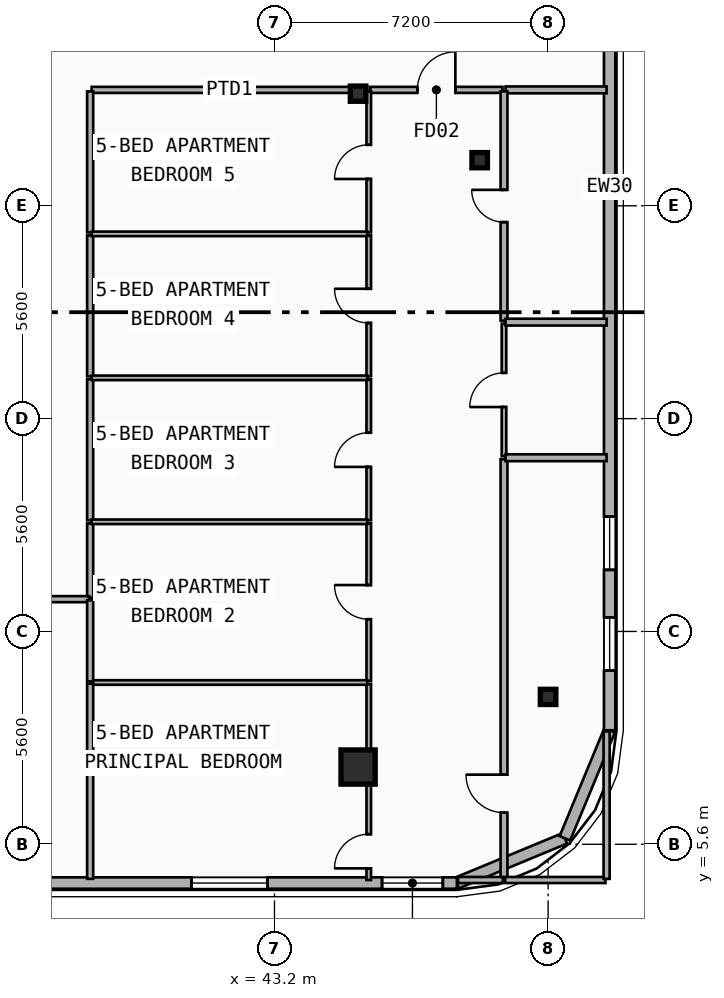
"""IFC4 building model, lengths in metres.
Left out: names, types, materials, properties, quantities, classifications, styles, units other than length and angle.
Written with IfcOpenShell. Run it as: python <this file> out.ifc"""

import sys

from ifc_helpers import new_model, si_unit, direction, frame, frame_2d, origin, origin_2d, place, context, subcontext, project, spatial, rectangle, i_section, extrude, element, fill, save


model = new_model("IFC4")
c1 = context("Model", 3, precision=1e-05, world=origin(), true_north=direction((0.0, 1.0)))
c2 = subcontext(c1, "Body", "Model", "MODEL_VIEW")
j1 = project(units=[si_unit("LENGTHUNIT", "METRE"), si_unit("PLANEANGLEUNIT", "RADIAN")], contexts=[c1])
p1 = place(None, origin())
s1 = spatial("IfcSite", under=j1, at=p1, CompositionType="ELEMENT")
p2 = place(p1, origin())
s2 = spatial("IfcBuilding", under=s1, at=p2, CompositionType="ELEMENT")
p3 = place(p2, frame((0.0, 0.0, 204.0)))
s3 = spatial("IfcBuildingStorey", under=s2, at=p3, CompositionType="ELEMENT", Elevation=204.0)
p4 = place(p3, frame((45.4, 25.35, 0.0), z_axis=(0.0, 0.0, 1.0), x_axis=(1.0, 0.0, 0.0)))
e1 = element("IfcColumn", 1, at=p4, inside=s3, PredefinedType="COLUMN", context=c2, shape_type="SweptSolid", body=[
    extrude(i_section(OverallWidth=0.408, OverallDepth=0.4, WebThickness=0.025, FlangeThickness=0.039, FilletRadius=0.015, at=origin_2d()), origin(), (0.0, 0.0, 1.0), 3.6),
])
p5 = place(p3, frame((45.4, 7.741, 0.0), z_axis=(0.0, -0.090231265542, 0.995920839584), x_axis=(1.0, 0.0, 0.0)))
e2 = element("IfcColumn", 2, at=p5, inside=s3, PredefinedType="COLUMN", context=c2, shape_type="SweptSolid", body=[
    extrude(rectangle(XDim=0.9, YDim=0.9, at=origin_2d()), origin(), (0.0, 0.0, 1.0), 3.615),
])
p6 = place(p3, frame((48.6, 23.6, 0.0), z_axis=(0.0, 0.0, 1.0), x_axis=(1.0, 0.0, 0.0)))
e3 = element("IfcColumn", 3, at=p6, inside=s3, PredefinedType="COLUMN", context=c2, shape_type="SweptSolid", body=[
    extrude(i_section(OverallWidth=0.408, OverallDepth=0.4, WebThickness=0.025, FlangeThickness=0.039, FilletRadius=0.015, at=origin_2d()), origin(), (0.0, 0.0, 1.0), 3.6),
])
p7 = place(p3, frame((50.4, 9.574, 0.0), z_axis=(0.0, -0.079901051777, 0.996802799918), x_axis=(1.0, 0.0, 0.0)))
e4 = element("IfcColumn", 4, at=p7, inside=s3, PredefinedType="COLUMN", context=c2, shape_type="SweptSolid", body=[
    extrude(i_section(OverallWidth=0.408, OverallDepth=0.4, WebThickness=0.025, FlangeThickness=0.039, FilletRadius=0.015, at=origin_2d()), origin(), (0.0, 0.0, 1.0), 3.612),
])
p8 = place(p3, frame((50.843, 5.757, 0.0), z_axis=(0.0, 0.0, 1.0), x_axis=(-0.92389884758, -0.382636798336, 0.0)))
e5 = element("IfcWall", 5, at=p8, inside=s3, PredefinedType="SOLIDWALL", context=c2, shape_type="SweptSolid", body=[
    extrude(rectangle(XDim=3.077, YDim=0.3, at=frame_2d((1.538, 0.0))), origin(), (0.0, 0.0, 1.0), 3.34),
])
p9 = place(p3, frame((52.02, 8.6, 0.0), z_axis=(0.0, 0.0, 1.0), x_axis=(-0.382676475685, -0.923882414032, 0.0)))
e6 = element("IfcWall", 6, at=p9, inside=s3, PredefinedType="SOLIDWALL", context=c2, shape_type="SweptSolid", body=[
    extrude(rectangle(XDim=3.077, YDim=0.3, at=frame_2d((1.539, 0.0))), origin(), (0.0, 0.0, 1.0), 3.34),
])
p10 = place(p3, frame((52.02, 37.2, 0.0), z_axis=(0.0, 0.0, 1.0), x_axis=(0.0, -1.0, 0.0)))
e7 = element("IfcWall", 7, at=p10, inside=s3, PredefinedType="SOLIDWALL", context=c2, shape_type="SweptSolid", body=[
    extrude(rectangle(XDim=28.6, YDim=0.3, at=frame_2d((14.3, 0.0))), origin(), (0.0, 0.0, 1.0), 3.34),
])
p11 = place(p10, frame((2.38, 0.0, 0.34)))
e8 = element("IfcOpeningElement", 8, at=p11, cuts=e7, PredefinedType="OPENING", context=c2, shape_type="SweptSolid", body=[
    extrude(rectangle(XDim=1.4, YDim=2.1, at=frame_2d((0.7, 1.05))), frame((0.0, 0.16, 0.0), z_axis=(0.0, -1.0, 0.0), x_axis=(1.0, 0.0, 0.0)), (0.0, 0.0, 1.0), 0.32),
])
p12 = place(p10, frame((5.84, 0.0, 0.34)))
e9 = element("IfcOpeningElement", 9, at=p12, cuts=e7, PredefinedType="OPENING", context=c2, shape_type="SweptSolid", body=[
    extrude(rectangle(XDim=1.4, YDim=2.1, at=frame_2d((0.7, 1.05))), frame((0.0, 0.16, 0.0), z_axis=(0.0, -1.0, 0.0), x_axis=(1.0, 0.0, 0.0)), (0.0, 0.0, 1.0), 0.32),
])
p13 = place(p10, frame((22.979, 0.0, 0.34)))
e10 = element("IfcOpeningElement", 10, at=p13, cuts=e7, PredefinedType="OPENING", context=c2, shape_type="SweptSolid", body=[
    extrude(rectangle(XDim=1.4, YDim=2.1, at=frame_2d((0.7, 1.05))), frame((0.0, 0.16, 0.0), z_axis=(0.0, -1.0, 0.0), x_axis=(1.0, 0.0, 0.0)), (0.0, 0.0, 1.0), 0.32),
])
p14 = place(p10, frame((25.63, 0.0, 0.34)))
e11 = element("IfcOpeningElement", 11, at=p14, cuts=e7, PredefinedType="OPENING", context=c2, shape_type="SweptSolid", body=[
    extrude(rectangle(XDim=1.4, YDim=2.1, at=frame_2d((0.7, 1.05))), frame((0.0, 0.16, 0.0), z_axis=(0.0, -1.0, 0.0), x_axis=(1.0, 0.0, 0.0)), (0.0, 0.0, 1.0), 0.32),
])
p15 = place(p3, frame((48.0, 4.58, 0.0), z_axis=(0.0, 0.0, 1.0), x_axis=(-1.0, 0.0, 0.0)))
e12 = element("IfcWall", 12, at=p15, inside=s3, PredefinedType="SOLIDWALL", context=c2, shape_type="SweptSolid", body=[
    extrude(rectangle(XDim=38.4, YDim=0.3, at=frame_2d((19.2, 0.0))), origin(), (0.0, 0.0, 1.0), 3.34),
])
p16 = place(p15, frame((36.19, 0.0, 0.8)))
e13 = element("IfcOpeningElement", 13, at=p16, cuts=e12, PredefinedType="OPENING", context=c2, shape_type="SweptSolid", body=[
    extrude(rectangle(XDim=1.8, YDim=1.8, at=frame_2d((0.9, 0.9))), frame((0.0, 0.16, 0.0), z_axis=(0.0, -1.0, 0.0), x_axis=(1.0, 0.0, 0.0)), (0.0, 0.0, 1.0), 0.32),
])
p17 = place(p15, frame((31.475, 0.0, 0.7)))
e14 = element("IfcOpeningElement", 14, at=p17, cuts=e12, PredefinedType="OPENING", context=c2, shape_type="SweptSolid", body=[
    extrude(rectangle(XDim=2.0, YDim=2.2, at=frame_2d((1.0, 1.1))), frame((0.0, 0.16, 0.0), z_axis=(0.0, -1.0, 0.0), x_axis=(1.0, 0.0, 0.0)), (0.0, 0.0, 1.0), 0.32),
])
p18 = place(p15, frame((18.6, 0.0, 0.7)))
e15 = element("IfcOpeningElement", 15, at=p18, cuts=e12, PredefinedType="OPENING", context=c2, shape_type="SweptSolid", body=[
    extrude(rectangle(XDim=2.0, YDim=2.2, at=frame_2d((1.0, 1.1))), frame((0.0, 0.16, 0.0), z_axis=(0.0, -1.0, 0.0), x_axis=(1.0, 0.0, 0.0)), (0.0, 0.0, 1.0), 0.32),
])
p19 = place(p15, frame((0.369, 0.0, 0.75)))
e16 = element("IfcOpeningElement", 16, at=p19, cuts=e12, PredefinedType="OPENING", context=c2, shape_type="SweptSolid", body=[
    extrude(rectangle(XDim=1.6, YDim=1.95, at=frame_2d((0.8, 0.975))), frame((0.0, 0.16, 0.0), z_axis=(0.0, -1.0, 0.0), x_axis=(1.0, 0.0, 0.0)), (0.0, 0.0, 1.0), 0.32),
])
p20 = place(p15, frame((4.985, 0.0, 0.7)))
e17 = element("IfcOpeningElement", 17, at=p20, cuts=e12, PredefinedType="OPENING", context=c2, shape_type="SweptSolid", body=[
    extrude(rectangle(XDim=2.0, YDim=2.2, at=frame_2d((1.0, 1.1))), frame((0.0, 0.16, 0.0), z_axis=(0.0, -1.0, 0.0), x_axis=(1.0, 0.0, 0.0)), (0.0, 0.0, 1.0), 0.32),
])
p21 = place(p3, frame((45.721, 25.45, 0.0), z_axis=(0.0, 0.0, 1.0), x_axis=(1.0, 0.0, 0.0)))
e18 = element("IfcWall", 18, at=p21, inside=s3, PredefinedType="PARTITIONING", context=c2, shape_type="SweptSolid", body=[
    extrude(rectangle(XDim=3.479, YDim=0.16, at=frame_2d((1.74, 0.0))), origin(), (0.0, 0.0, 1.0), 2.52),
])
p22 = place(p21, frame((1.24, 0.0, 0.0)))
e19 = element("IfcOpeningElement", 19, at=p22, cuts=e18, PredefinedType="OPENING", context=c2, shape_type="SweptSolid", body=[
    extrude(rectangle(XDim=1.0, YDim=2.15, at=frame_2d((0.5, 1.075))), frame((0.0, 0.09, 0.0), z_axis=(0.0, -1.0, 0.0), x_axis=(1.0, 0.0, 0.0)), (0.0, 0.0, 1.0), 0.18),
])
p23 = place(p3, frame((49.28, 25.45, 0.0), z_axis=(0.0, 0.0, 1.0), x_axis=(1.0, 0.0, 0.0)))
e20 = element("IfcWall", 20, at=p23, inside=s3, PredefinedType="PLUMBINGWALL", context=c2, shape_type="SweptSolid", body=[
    extrude(rectangle(XDim=2.66, YDim=0.18, at=frame_2d((1.33, 0.0))), origin(), (0.0, 0.0, 1.0), 2.67),
])
p24 = place(p3, frame((38.39, 25.45, 0.0), z_axis=(0.0, 0.0, 1.0), x_axis=(1.0, 0.0, 0.0)))
e21 = element("IfcWall", 21, at=p24, inside=s3, PredefinedType="PARTITIONING", context=c2, shape_type="SweptSolid", body=[
    extrude(rectangle(XDim=7.251, YDim=0.16, at=frame_2d((3.625, 0.0))), origin(), (0.0, 0.0, 1.0), 2.52),
])
p25 = place(p3, frame((38.35, 12.09, 0.0), z_axis=(0.0, 0.0, 1.0), x_axis=(0.0, 1.0, 0.0)))
e22 = element("IfcWall", 22, at=p25, inside=s3, PredefinedType="PARTITIONING", context=c2, shape_type="SweptSolid", body=[
    extrude(rectangle(XDim=1.955, YDim=0.16, at=frame_2d((0.978, 0.0))), origin(), (0.0, 0.0, 1.0), 3.34),
])
p26 = place(p3, frame((38.35, 14.125, 0.0), z_axis=(0.0, 0.0, 1.0), x_axis=(0.0, 1.0, 0.0)))
e23 = element("IfcWall", 23, at=p26, inside=s3, PredefinedType="PARTITIONING", context=c2, shape_type="SweptSolid", body=[
    extrude(rectangle(XDim=3.708, YDim=0.16, at=frame_2d((1.854, 0.0))), origin(), (0.0, 0.0, 1.0), 3.01),
])
p27 = place(p3, frame((38.35, 17.913, 0.0), z_axis=(0.0, 0.0, 1.0), x_axis=(0.0, 1.0, 0.0)))
e24 = element("IfcWall", 24, at=p27, inside=s3, PredefinedType="PARTITIONING", context=c2, shape_type="SweptSolid", body=[
    extrude(rectangle(XDim=3.708, YDim=0.16, at=frame_2d((1.854, 0.0))), origin(), (0.0, 0.0, 1.0), 2.88),
])
p28 = place(p3, frame((38.35, 21.701, 0.0), z_axis=(0.0, 0.0, 1.0), x_axis=(0.0, 1.0, 0.0)))
e25 = element("IfcWall", 25, at=p28, inside=s3, PredefinedType="PARTITIONING", context=c2, shape_type="SweptSolid", body=[
    extrude(rectangle(XDim=3.709, YDim=0.16, at=frame_2d((1.854, 0.0))), origin(), (0.0, 0.0, 1.0), 3.01),
])
p29 = place(p3, frame((49.24, 4.66, 0.0), z_axis=(0.0, 0.0, 1.0), x_axis=(0.0, 1.0, 0.0)))
e26 = element("IfcWall", 26, at=p29, inside=s3, PredefinedType="PLUMBINGWALL", context=c2, shape_type="SweptSolid", body=[
    extrude(rectangle(XDim=11.071, YDim=0.18, at=frame_2d((5.536, 0.0))), origin(), (0.0, 0.0, 1.0), 2.82),
])
p30 = place(p29, frame((1.772, 0.0, 0.0)))
e27 = element("IfcOpeningElement", 27, at=p30, cuts=e26, PredefinedType="OPENING", context=c2, shape_type="SweptSolid", body=[
    extrude(rectangle(XDim=1.0, YDim=2.15, at=frame_2d((0.5, 1.075))), frame((0.0, 0.1, 0.0), z_axis=(0.0, -1.0, 0.0), x_axis=(1.0, 0.0, 0.0)), (0.0, 0.0, 1.0), 0.2),
])
p31 = place(p3, frame((49.24, 15.811, 0.0), z_axis=(0.0, 0.0, 1.0), x_axis=(0.0, 1.0, 0.0)))
e28 = element("IfcWall", 28, at=p31, inside=s3, PredefinedType="PARTITIONING", context=c2, shape_type="SweptSolid", body=[
    extrude(rectangle(XDim=3.488, YDim=0.12, at=frame_2d((1.744, 0.0))), origin(), (0.0, 0.0, 1.0), 2.82),
])
p32 = place(p31, frame((1.294, 0.0, 0.0)))
e29 = element("IfcOpeningElement", 29, at=p32, cuts=e28, PredefinedType="OPENING", context=c2, shape_type="SweptSolid", body=[
    extrude(rectangle(XDim=0.9, YDim=2.1, at=frame_2d((0.45, 1.05))), frame((0.0, 0.07, 0.0), z_axis=(0.0, -1.0, 0.0), x_axis=(1.0, 0.0, 0.0)), (0.0, 0.0, 1.0), 0.14),
])
p33 = place(p3, frame((49.24, 19.379, 0.0), z_axis=(0.0, 0.0, 1.0), x_axis=(0.0, 1.0, 0.0)))
e30 = element("IfcWall", 30, at=p33, inside=s3, PredefinedType="PLUMBINGWALL", context=c2, shape_type="SweptSolid", body=[
    extrude(rectangle(XDim=6.031, YDim=0.18, at=frame_2d((3.016, 0.0))), origin(), (0.0, 0.0, 1.0), 2.82),
])
p34 = place(p33, frame((2.591, 0.0, 0.0)))
e31 = element("IfcOpeningElement", 31, at=p34, cuts=e30, PredefinedType="OPENING", context=c2, shape_type="SweptSolid", body=[
    extrude(rectangle(XDim=0.85, YDim=2.1, at=frame_2d((0.425, 1.05))), frame((0.0, 0.1, 0.0), z_axis=(0.0, -1.0, 0.0), x_axis=(1.0, 0.0, 0.0)), (0.0, 0.0, 1.0), 0.2),
])
p35 = place(p3, frame((45.681, 4.66, 0.0), z_axis=(0.0, 0.0, 1.0), x_axis=(0.0, 1.0, 0.0)))
e32 = element("IfcWall", 32, at=p35, inside=s3, PredefinedType="PARTITIONING", context=c2, shape_type="SweptSolid", body=[
    extrude(rectangle(XDim=5.157, YDim=0.12, at=frame_2d((2.579, 0.0))), origin(), (0.0, 0.0, 1.0), 2.52),
])
p36 = place(p35, frame((0.306, 0.0, 0.0)))
e33 = element("IfcOpeningElement", 33, at=p36, cuts=e32, PredefinedType="OPENING", context=c2, shape_type="SweptSolid", body=[
    extrude(rectangle(XDim=0.9, YDim=2.1, at=frame_2d((0.45, 1.05))), frame((0.0, 0.07, 0.0), z_axis=(0.0, -1.0, 0.0), x_axis=(1.0, 0.0, 0.0)), (0.0, 0.0, 1.0), 0.14),
])
p37 = place(p3, frame((45.681, 9.897, 0.0), z_axis=(0.0, 0.0, 1.0), x_axis=(0.0, 1.0, 0.0)))
e34 = element("IfcWall", 34, at=p37, inside=s3, PredefinedType="PARTITIONING", context=c2, shape_type="SweptSolid", body=[
    extrude(rectangle(XDim=4.148, YDim=0.12, at=frame_2d((2.074, 0.0))), origin(), (0.0, 0.0, 1.0), 2.52),
])
p38 = place(p37, frame((1.624, 0.0, 0.0)))
e35 = element("IfcOpeningElement", 35, at=p38, cuts=e34, PredefinedType="OPENING", context=c2, shape_type="SweptSolid", body=[
    extrude(rectangle(XDim=0.9, YDim=2.1, at=frame_2d((0.45, 1.05))), frame((0.0, 0.07, 0.0), z_axis=(0.0, -1.0, 0.0), x_axis=(1.0, 0.0, 0.0)), (0.0, 0.0, 1.0), 0.14),
])
p39 = place(p3, frame((45.681, 14.125, 0.0), z_axis=(0.0, 0.0, 1.0), x_axis=(0.0, 1.0, 0.0)))
e36 = element("IfcWall", 36, at=p39, inside=s3, PredefinedType="PARTITIONING", context=c2, shape_type="SweptSolid", body=[
    extrude(rectangle(XDim=3.708, YDim=0.12, at=frame_2d((1.854, 0.0))), origin(), (0.0, 0.0, 1.0), 2.52),
])
p40 = place(p39, frame((1.404, 0.0, 0.0)))
e37 = element("IfcOpeningElement", 37, at=p40, cuts=e36, PredefinedType="OPENING", context=c2, shape_type="SweptSolid", body=[
    extrude(rectangle(XDim=0.9, YDim=2.1, at=frame_2d((0.45, 1.05))), frame((0.0, 0.07, 0.0), z_axis=(0.0, -1.0, 0.0), x_axis=(1.0, 0.0, 0.0)), (0.0, 0.0, 1.0), 0.14),
])
p41 = place(p3, frame((45.681, 17.913, 0.0), z_axis=(0.0, 0.0, 1.0), x_axis=(0.0, 1.0, 0.0)))
e38 = element("IfcWall", 38, at=p41, inside=s3, PredefinedType="PARTITIONING", context=c2, shape_type="SweptSolid", body=[
    extrude(rectangle(XDim=3.708, YDim=0.12, at=frame_2d((1.854, 0.0))), origin(), (0.0, 0.0, 1.0), 2.52),
])
p42 = place(p41, frame((1.404, 0.0, 0.0)))
e39 = element("IfcOpeningElement", 39, at=p42, cuts=e38, PredefinedType="OPENING", context=c2, shape_type="SweptSolid", body=[
    extrude(rectangle(XDim=0.9, YDim=2.1, at=frame_2d((0.45, 1.05))), frame((0.0, 0.07, 0.0), z_axis=(0.0, -1.0, 0.0), x_axis=(1.0, 0.0, 0.0)), (0.0, 0.0, 1.0), 0.14),
])
p43 = place(p3, frame((45.681, 21.701, 0.0), z_axis=(0.0, 0.0, 1.0), x_axis=(0.0, 1.0, 0.0)))
e40 = element("IfcWall", 40, at=p43, inside=s3, PredefinedType="PARTITIONING", context=c2, shape_type="SweptSolid", body=[
    extrude(rectangle(XDim=3.709, YDim=0.12, at=frame_2d((1.854, 0.0))), origin(), (0.0, 0.0, 1.0), 2.52),
])
p44 = place(p43, frame((1.405, 0.0, 0.0)))
e41 = element("IfcOpeningElement", 41, at=p44, cuts=e40, PredefinedType="OPENING", context=c2, shape_type="SweptSolid", body=[
    extrude(rectangle(XDim=0.9, YDim=2.1, at=frame_2d((0.45, 1.05))), frame((0.0, 0.07, 0.0), z_axis=(0.0, -1.0, 0.0), x_axis=(1.0, 0.0, 0.0)), (0.0, 0.0, 1.0), 0.14),
])
for number, where, z_axis, x_axis in (
    (42, (49.28, 15.771, 0.0), (0.0, 0.0, 1.0), (1.0, 0.0, 0.0)),
    (43, (49.28, 19.339, 0.0), (0.0, 0.0, 1.0), (1.0, 0.0, 0.0)),
):
    element("IfcWall", number, at=place(p3, frame(where, z_axis=z_axis, x_axis=x_axis)), inside=s3, PredefinedType="PLUMBINGWALL", context=c2, shape_type="SweptSolid", body=[
        extrude(rectangle(XDim=2.66, YDim=0.18, at=frame_2d((1.33, 0.0))), origin(), (0.0, 0.0, 1.0), 2.67),
    ])
for number, where, z_axis, x_axis in (
    (44, (38.39, 9.857, 0.0), (0.0, 0.0, 1.0), (1.0, 0.0, 0.0)),
    (45, (38.39, 14.085, 0.0), (0.0, 0.0, 1.0), (1.0, 0.0, 0.0)),
    (46, (38.39, 17.873, 0.0), (0.0, 0.0, 1.0), (1.0, 0.0, 0.0)),
    (47, (38.39, 21.661, 0.0), (0.0, 0.0, 1.0), (1.0, 0.0, 0.0)),
):
    element("IfcWall", number, at=place(p3, frame(where, z_axis=z_axis, x_axis=x_axis)), inside=s3, PredefinedType="PARTITIONING", context=c2, shape_type="SweptSolid", body=[
        extrude(rectangle(XDim=7.251, YDim=0.12, at=frame_2d((3.625, 0.0))), origin(), (0.0, 0.0, 1.0), 2.52),
    ])
p45 = place(p3, frame((36.38, 12.05, 0.0), z_axis=(0.0, 0.0, 1.0), x_axis=(1.0, 0.0, 0.0)))
e48 = element("IfcWall", 48, at=p45, inside=s3, PredefinedType="PARTITIONING", context=c2, shape_type="SweptSolid", body=[
    extrude(rectangle(XDim=1.94, YDim=0.16, at=frame_2d((0.97, 0.0))), origin(), (0.0, 0.0, 1.0), 2.52),
])
p46 = place(p3, frame((48.03, 4.66, 0.0), z_axis=(0.0, 0.0, 1.0), x_axis=(1.0, 0.0, 0.0)))
e49 = element("IfcWall", 49, at=p46, inside=s3, PredefinedType="PARTITIONING", context=c2, shape_type="SweptSolid", body=[
    extrude(rectangle(XDim=1.18, YDim=0.16, at=frame_2d((0.59, 0.0))), origin(), (0.0, 0.0, 1.0), 3.34),
])
p47 = place(p3, frame((49.27, 4.66, 0.0), z_axis=(0.0, 0.0, 1.0), x_axis=(1.0, 0.0, 0.0)))
e50 = element("IfcWall", 50, at=p47, inside=s3, PredefinedType="PARTITIONING", context=c2, shape_type="SweptSolid", body=[
    extrude(rectangle(XDim=2.64, YDim=0.16, at=frame_2d((1.32, 0.0))), origin(), (0.0, 0.0, 1.0), 3.34),
])
p48 = place(p3, frame((51.94, 4.69, 0.0), z_axis=(0.0, 0.0, 1.0), x_axis=(0.0, 1.0, 0.0)))
e51 = element("IfcWall", 51, at=p48, inside=s3, PredefinedType="PARTITIONING", context=c2, shape_type="SweptSolid", body=[
    extrude(rectangle(XDim=3.88, YDim=0.16, at=frame_2d((1.94, 0.0))), origin(), (0.0, 0.0, 1.0), 3.34),
])
p49 = place(p3, frame((38.35, 4.69, 0.0), z_axis=(0.0, 0.0, 1.0), x_axis=(0.0, 1.0, 0.0)))
e52 = element("IfcWall", 52, at=p49, inside=s3, PredefinedType="PARTITIONING", context=c2, shape_type="SweptSolid", body=[
    extrude(rectangle(XDim=5.137, YDim=0.16, at=frame_2d((2.568, 0.0))), origin(), (0.0, 0.0, 1.0), 3.0),
])
p50 = place(p3, frame((38.35, 9.887, 0.0), z_axis=(0.0, 0.0, 1.0), x_axis=(0.0, 1.0, 0.0)))
e53 = element("IfcWall", 53, at=p50, inside=s3, PredefinedType="PARTITIONING", context=c2, shape_type="SweptSolid", body=[
    extrude(rectangle(XDim=2.133, YDim=0.16, at=frame_2d((1.066, 0.0))), origin(), (0.0, 0.0, 1.0), 2.88),
])
p51 = place(p13, origin())
e54 = element("IfcWindow", 54, at=p51, inside=s3, PartitioningType="SINGLE_PANEL", PredefinedType="WINDOW", context=c2, shape_type="SweptSolid", body=[
    extrude(rectangle(XDim=1.4, YDim=2.1, at=frame_2d((0.7, 1.05))), frame((0.0, 0.03, 0.0), z_axis=(0.0, -1.0, 0.0), x_axis=(1.0, 0.0, 0.0)), (0.0, 0.0, 1.0), 0.06),
])
fill(e10, e54)
p52 = place(p14, origin())
e55 = element("IfcWindow", 55, at=p52, inside=s3, PartitioningType="SINGLE_PANEL", PredefinedType="WINDOW", context=c2, shape_type="SweptSolid", body=[
    extrude(rectangle(XDim=1.4, YDim=2.1, at=frame_2d((0.7, 1.05))), frame((0.0, 0.03, 0.0), z_axis=(0.0, -1.0, 0.0), x_axis=(1.0, 0.0, 0.0)), (0.0, 0.0, 1.0), 0.06),
])
fill(e11, e55)
p53 = place(p19, origin())
e56 = element("IfcWindow", 56, at=p53, inside=s3, PartitioningType="SINGLE_PANEL", PredefinedType="WINDOW", context=c2, shape_type="SweptSolid", body=[
    extrude(rectangle(XDim=1.6, YDim=1.95, at=frame_2d((0.8, 0.975))), frame((0.0, 0.03, 0.0), z_axis=(0.0, -1.0, 0.0), x_axis=(1.0, 0.0, 0.0)), (0.0, 0.0, 1.0), 0.06),
])
fill(e16, e56)
p54 = place(p20, origin())
e57 = element("IfcWindow", 57, at=p54, inside=s3, PartitioningType="SINGLE_PANEL", PredefinedType="WINDOW", context=c2, shape_type="SweptSolid", body=[
    extrude(rectangle(XDim=2.0, YDim=2.2, at=frame_2d((1.0, 1.1))), frame((0.0, 0.03, 0.0), z_axis=(0.0, -1.0, 0.0), x_axis=(1.0, 0.0, 0.0)), (0.0, 0.0, 1.0), 0.06),
])
fill(e17, e57)
p55 = place(p22, origin())
e58 = element("IfcDoor", 58, at=p55, inside=s3, OperationType="SINGLE_SWING_RIGHT", PredefinedType="DOOR", context=c2, shape_type="SweptSolid", body=[
    extrude(rectangle(XDim=1.0, YDim=2.15, at=frame_2d((0.5, 1.075))), frame((0.0, 0.025, 0.0), z_axis=(0.0, -1.0, 0.0), x_axis=(1.0, 0.0, 0.0)), (0.0, 0.0, 1.0), 0.05),
])
fill(e19, e58)
p56 = place(p30, origin())
e59 = element("IfcDoor", 59, at=p56, inside=s3, OperationType="SINGLE_SWING_RIGHT", PredefinedType="DOOR", context=c2, shape_type="SweptSolid", body=[
    extrude(rectangle(XDim=1.0, YDim=2.15, at=frame_2d((0.5, 1.075))), frame((0.0, 0.025, 0.0), z_axis=(0.0, -1.0, 0.0), x_axis=(1.0, 0.0, 0.0)), (0.0, 0.0, 1.0), 0.05),
])
fill(e27, e59)
p57 = place(p32, origin())
e60 = element("IfcDoor", 60, at=p57, inside=s3, OperationType="SINGLE_SWING_LEFT", PredefinedType="DOOR", context=c2, shape_type="SweptSolid", body=[
    extrude(rectangle(XDim=0.9, YDim=2.1, at=frame_2d((0.45, 1.05))), frame((0.0, 0.025, 0.0), z_axis=(0.0, -1.0, 0.0), x_axis=(1.0, 0.0, 0.0)), (0.0, 0.0, 1.0), 0.05),
])
fill(e29, e60)
p58 = place(p34, origin())
e61 = element("IfcDoor", 61, at=p58, inside=s3, OperationType="SINGLE_SWING_RIGHT", PredefinedType="DOOR", context=c2, shape_type="SweptSolid", body=[
    extrude(rectangle(XDim=0.85, YDim=2.1, at=frame_2d((0.425, 1.05))), frame((0.0, 0.025, 0.0), z_axis=(0.0, -1.0, 0.0), x_axis=(1.0, 0.0, 0.0)), (0.0, 0.0, 1.0), 0.05),
])
fill(e31, e61)
p59 = place(p36, origin())
e62 = element("IfcDoor", 62, at=p59, inside=s3, OperationType="SINGLE_SWING_LEFT", PredefinedType="DOOR", context=c2, shape_type="SweptSolid", body=[
    extrude(rectangle(XDim=0.9, YDim=2.1, at=frame_2d((0.45, 1.05))), frame((0.0, 0.025, 0.0), z_axis=(0.0, -1.0, 0.0), x_axis=(1.0, 0.0, 0.0)), (0.0, 0.0, 1.0), 0.05),
])
fill(e33, e62)
p60 = place(p38, origin())
e63 = element("IfcDoor", 63, at=p60, inside=s3, OperationType="SINGLE_SWING_RIGHT", PredefinedType="DOOR", context=c2, shape_type="SweptSolid", body=[
    extrude(rectangle(XDim=0.9, YDim=2.1, at=frame_2d((0.45, 1.05))), frame((0.0, 0.025, 0.0), z_axis=(0.0, -1.0, 0.0), x_axis=(1.0, 0.0, 0.0)), (0.0, 0.0, 1.0), 0.05),
])
fill(e35, e63)
p61 = place(p40, origin())
e64 = element("IfcDoor", 64, at=p61, inside=s3, OperationType="SINGLE_SWING_LEFT", PredefinedType="DOOR", context=c2, shape_type="SweptSolid", body=[
    extrude(rectangle(XDim=0.9, YDim=2.1, at=frame_2d((0.45, 1.05))), frame((0.0, 0.025, 0.0), z_axis=(0.0, -1.0, 0.0), x_axis=(1.0, 0.0, 0.0)), (0.0, 0.0, 1.0), 0.05),
])
fill(e37, e64)
p62 = place(p42, origin())
e65 = element("IfcDoor", 65, at=p62, inside=s3, OperationType="SINGLE_SWING_RIGHT", PredefinedType="DOOR", context=c2, shape_type="SweptSolid", body=[
    extrude(rectangle(XDim=0.9, YDim=2.1, at=frame_2d((0.45, 1.05))), frame((0.0, 0.025, 0.0), z_axis=(0.0, -1.0, 0.0), x_axis=(1.0, 0.0, 0.0)), (0.0, 0.0, 1.0), 0.05),
])
fill(e39, e65)
p63 = place(p44, origin())
e66 = element("IfcDoor", 66, at=p63, inside=s3, OperationType="SINGLE_SWING_LEFT", PredefinedType="DOOR", context=c2, shape_type="SweptSolid", body=[
    extrude(rectangle(XDim=0.9, YDim=2.1, at=frame_2d((0.45, 1.05))), frame((0.0, 0.025, 0.0), z_axis=(0.0, -1.0, 0.0), x_axis=(1.0, 0.0, 0.0)), (0.0, 0.0, 1.0), 0.05),
])
fill(e41, e66)
save(model, sys.argv[1])
